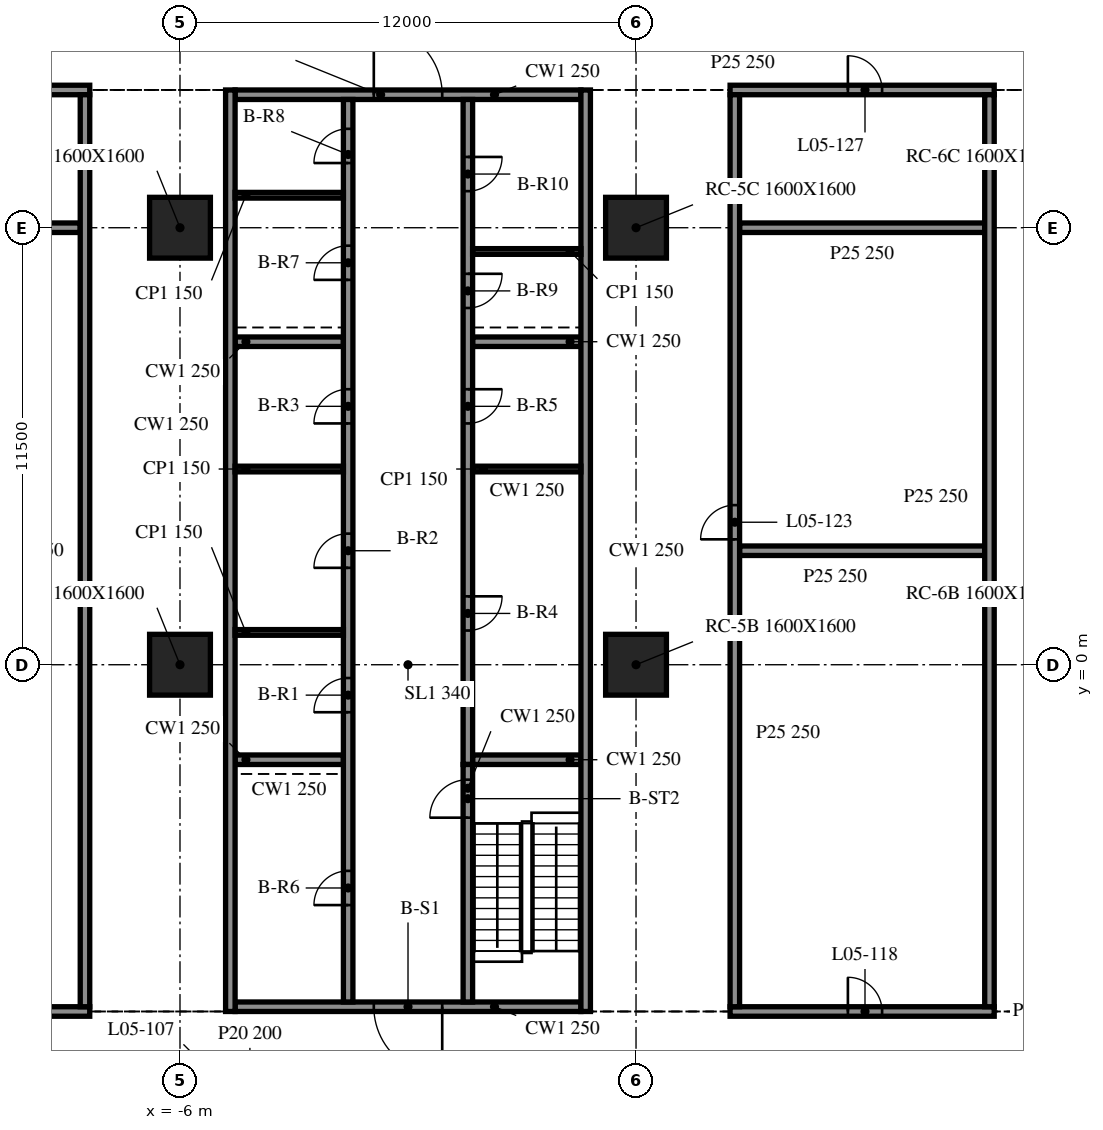
"""IFC4 building model, lengths in metres.
Left out: names, types, materials, properties, quantities, classifications, styles, units other than length and angle.
Written with IfcOpenShell. Run it as: python <this file> out.ifc"""

import sys

from ifc_helpers import new_model, si_unit, direction, frame, frame_2d, origin, origin_2d, place, context, subcontext, project, spatial, rectangle, extrude, element, fill, save


model = new_model("IFC4")
c1 = context("Model", 3, precision=1e-05, world=origin(), true_north=direction((0.0, 1.0)))
c2 = subcontext(c1, "Body", "Model", "MODEL_VIEW")
j1 = project(units=[si_unit("LENGTHUNIT", "METRE"), si_unit("PLANEANGLEUNIT", "RADIAN")], contexts=[c1])
p1 = place(None, origin())
s1 = spatial("IfcSite", under=j1, at=p1, CompositionType="ELEMENT")
p2 = place(p1, origin())
s2 = spatial("IfcBuilding", under=s1, at=p2, CompositionType="ELEMENT")
p3 = place(p2, frame((0.0, 0.0, 24.4)))
s3 = spatial("IfcBuildingStorey", under=s2, at=p3, CompositionType="ELEMENT", Elevation=24.4)
for number, where, z_axis, x_axis in (
    (1, (-6.0, 0.0, -0.34), (0.0, 0.0, 1.0), (1.0, 0.0, 0.0)),
    (2, (-6.0, 11.5, -0.34), (0.0, 0.0, 1.0), (1.0, 0.0, 0.0)),
    (3, (6.0, 0.0, -0.34), (0.0, 0.0, 1.0), (1.0, 0.0, 0.0)),
    (4, (6.0, 11.5, -0.34), (0.0, 0.0, 1.0), (1.0, 0.0, 0.0)),
):
    element("IfcColumn", number, at=place(p3, frame(where, z_axis=z_axis, x_axis=x_axis)), inside=s3, PredefinedType="COLUMN", context=c2, shape_type="SweptSolid", body=[
        extrude(rectangle(XDim=1.6, YDim=1.6, at=origin_2d()), origin(), (0.0, 0.0, 1.0), 4.3),
    ])
for number, where, z_axis, x_axis in (
    (5, (-4.675, 15.125, 0.0), (0.0, 0.0, 1.0), (0.0, -1.0, 0.0)),
    (6, (4.675, -9.125, 0.0), (0.0, 0.0, 1.0), (0.0, 1.0, 0.0)),
):
    element("IfcWall", number, at=place(p3, frame(where, z_axis=z_axis, x_axis=x_axis)), inside=s3, PredefinedType="SOLIDWALL", context=c2, shape_type="SweptSolid", body=[
        extrude(rectangle(XDim=24.25, YDim=0.25, at=frame_2d((12.125, 0.0))), origin(), (0.0, 0.0, 1.0), 3.96),
    ])
p4 = place(p3, frame((4.55, -9.0, 0.0), z_axis=(0.0, 0.0, 1.0), x_axis=(-1.0, 0.0, 0.0)))
e7 = element("IfcWall", 7, at=p4, inside=s3, PredefinedType="SOLIDWALL", context=c2, shape_type="SweptSolid", body=[
    extrude(rectangle(XDim=9.1, YDim=0.25, at=frame_2d((4.55, 0.0))), origin(), (0.0, 0.0, 1.0), 3.96),
])
p5 = place(p4, frame((3.65, 0.0, 0.0)))
e8 = element("IfcOpeningElement", 8, at=p5, cuts=e7, PredefinedType="OPENING", context=c2, shape_type="SweptSolid", body=[
    extrude(rectangle(XDim=1.8, YDim=2.1, at=frame_2d((0.9, 1.05))), frame((0.0, 0.135, 0.0), z_axis=(0.0, -1.0, 0.0), x_axis=(1.0, 0.0, 0.0)), (0.0, 0.0, 1.0), 0.27),
])
p6 = place(p3, frame((-4.55, 15.0, 0.0), z_axis=(0.0, 0.0, 1.0), x_axis=(1.0, 0.0, 0.0)))
e9 = element("IfcWall", 9, at=p6, inside=s3, PredefinedType="SOLIDWALL", context=c2, shape_type="SweptSolid", body=[
    extrude(rectangle(XDim=9.1, YDim=0.25, at=frame_2d((4.55, 0.0))), origin(), (0.0, 0.0, 1.0), 3.96),
])
p7 = place(p6, frame((3.65, 0.0, 0.0)))
e10 = element("IfcOpeningElement", 10, at=p7, cuts=e9, PredefinedType="OPENING", context=c2, shape_type="SweptSolid", body=[
    extrude(rectangle(XDim=1.8, YDim=2.1, at=frame_2d((0.9, 1.05))), frame((0.0, 0.135, 0.0), z_axis=(0.0, -1.0, 0.0), x_axis=(1.0, 0.0, 0.0)), (0.0, 0.0, 1.0), 0.27),
])
p8 = place(p3, frame((-1.575, -8.875, 0.0), z_axis=(0.0, 0.0, 1.0), x_axis=(0.0, 1.0, 0.0)))
e11 = element("IfcWall", 11, at=p8, inside=s3, PredefinedType="SOLIDWALL", context=c2, shape_type="SweptSolid", body=[
    extrude(rectangle(XDim=23.75, YDim=0.25, at=frame_2d((11.875, 0.0))), origin(), (0.0, 0.0, 1.0), 3.96),
])
p9 = place(p8, frame((7.625, 0.0, 0.0)))
e12 = element("IfcOpeningElement", 12, at=p9, cuts=e11, PredefinedType="OPENING", context=c2, shape_type="SweptSolid", body=[
    extrude(rectangle(XDim=0.9, YDim=2.1, at=frame_2d((0.45, 1.05))), frame((0.0, 0.135, 0.0), z_axis=(0.0, -1.0, 0.0), x_axis=(1.0, 0.0, 0.0)), (0.0, 0.0, 1.0), 0.27),
])
p10 = place(p8, frame((11.425, 0.0, 0.0)))
e13 = element("IfcOpeningElement", 13, at=p10, cuts=e11, PredefinedType="OPENING", context=c2, shape_type="SweptSolid", body=[
    extrude(rectangle(XDim=0.9, YDim=2.1, at=frame_2d((0.45, 1.05))), frame((0.0, 0.135, 0.0), z_axis=(0.0, -1.0, 0.0), x_axis=(1.0, 0.0, 0.0)), (0.0, 0.0, 1.0), 0.27),
])
p11 = place(p8, frame((15.225, 0.0, 0.0)))
e14 = element("IfcOpeningElement", 14, at=p11, cuts=e11, PredefinedType="OPENING", context=c2, shape_type="SweptSolid", body=[
    extrude(rectangle(XDim=0.9, YDim=2.1, at=frame_2d((0.45, 1.05))), frame((0.0, 0.135, 0.0), z_axis=(0.0, -1.0, 0.0), x_axis=(1.0, 0.0, 0.0)), (0.0, 0.0, 1.0), 0.27),
])
p12 = place(p8, frame((2.55, 0.0, 0.0)))
e15 = element("IfcOpeningElement", 15, at=p12, cuts=e11, PredefinedType="OPENING", context=c2, shape_type="SweptSolid", body=[
    extrude(rectangle(XDim=0.9, YDim=2.1, at=frame_2d((0.45, 1.05))), frame((0.0, 0.135, 0.0), z_axis=(0.0, -1.0, 0.0), x_axis=(1.0, 0.0, 0.0)), (0.0, 0.0, 1.0), 0.27),
])
p13 = place(p8, frame((19.002, 0.0, 0.0)))
e16 = element("IfcOpeningElement", 16, at=p13, cuts=e11, PredefinedType="OPENING", context=c2, shape_type="SweptSolid", body=[
    extrude(rectangle(XDim=0.9, YDim=2.1, at=frame_2d((0.45, 1.05))), frame((0.0, 0.135, 0.0), z_axis=(0.0, -1.0, 0.0), x_axis=(1.0, 0.0, 0.0)), (0.0, 0.0, 1.0), 0.27),
])
p14 = place(p8, frame((22.077, 0.0, 0.0)))
e17 = element("IfcOpeningElement", 17, at=p14, cuts=e11, PredefinedType="OPENING", context=c2, shape_type="SweptSolid", body=[
    extrude(rectangle(XDim=0.9, YDim=2.1, at=frame_2d((0.45, 1.05))), frame((0.0, 0.135, 0.0), z_axis=(0.0, -1.0, 0.0), x_axis=(1.0, 0.0, 0.0)), (0.0, 0.0, 1.0), 0.27),
])
p15 = place(p3, frame((1.575, -8.875, 0.0), z_axis=(0.0, 0.0, 1.0), x_axis=(0.0, 1.0, 0.0)))
e18 = element("IfcWall", 18, at=p15, inside=s3, PredefinedType="SOLIDWALL", context=c2, shape_type="SweptSolid", body=[
    extrude(rectangle(XDim=6.25, YDim=0.25, at=frame_2d((3.125, 0.0))), origin(), (0.0, 0.0, 1.0), 3.96),
])
p16 = place(p15, frame((4.85, 0.0, 0.0)))
e19 = element("IfcOpeningElement", 19, at=p16, cuts=e18, PredefinedType="OPENING", context=c2, shape_type="SweptSolid", body=[
    extrude(rectangle(XDim=1.0, YDim=2.1, at=frame_2d((0.5, 1.05))), frame((0.0, 0.135, 0.0), z_axis=(0.0, -1.0, 0.0), x_axis=(1.0, 0.0, 0.0)), (0.0, 0.0, 1.0), 0.27),
])
p17 = place(p3, frame((1.575, 14.875, 0.0), z_axis=(0.0, 0.0, 1.0), x_axis=(0.0, -1.0, 0.0)))
e20 = element("IfcWall", 20, at=p17, inside=s3, PredefinedType="SOLIDWALL", context=c2, shape_type="SweptSolid", body=[
    extrude(rectangle(XDim=17.5, YDim=0.25, at=frame_2d((8.75, 0.0))), origin(), (0.0, 0.0, 1.0), 3.96),
])
p18 = place(p17, frame((13.075, 0.0, 0.0)))
e21 = element("IfcOpeningElement", 21, at=p18, cuts=e20, PredefinedType="OPENING", context=c2, shape_type="SweptSolid", body=[
    extrude(rectangle(XDim=0.9, YDim=2.1, at=frame_2d((0.45, 1.05))), frame((0.0, 0.135, 0.0), z_axis=(0.0, -1.0, 0.0), x_axis=(1.0, 0.0, 0.0)), (0.0, 0.0, 1.0), 0.27),
])
p19 = place(p17, frame((7.625, 0.0, 0.0)))
e22 = element("IfcOpeningElement", 22, at=p19, cuts=e20, PredefinedType="OPENING", context=c2, shape_type="SweptSolid", body=[
    extrude(rectangle(XDim=0.9, YDim=2.1, at=frame_2d((0.45, 1.05))), frame((0.0, 0.135, 0.0), z_axis=(0.0, -1.0, 0.0), x_axis=(1.0, 0.0, 0.0)), (0.0, 0.0, 1.0), 0.27),
])
p20 = place(p17, frame((4.587, 0.0, 0.0)))
e23 = element("IfcOpeningElement", 23, at=p20, cuts=e20, PredefinedType="OPENING", context=c2, shape_type="SweptSolid", body=[
    extrude(rectangle(XDim=0.9, YDim=2.1, at=frame_2d((0.45, 1.05))), frame((0.0, 0.135, 0.0), z_axis=(0.0, -1.0, 0.0), x_axis=(1.0, 0.0, 0.0)), (0.0, 0.0, 1.0), 0.27),
])
p21 = place(p17, frame((1.512, 0.0, 0.0)))
e24 = element("IfcOpeningElement", 24, at=p21, cuts=e20, PredefinedType="OPENING", context=c2, shape_type="SweptSolid", body=[
    extrude(rectangle(XDim=0.9, YDim=2.1, at=frame_2d((0.45, 1.05))), frame((0.0, 0.135, 0.0), z_axis=(0.0, -1.0, 0.0), x_axis=(1.0, 0.0, 0.0)), (0.0, 0.0, 1.0), 0.27),
])
for number, where, z_axis, x_axis in (
    (25, (-4.55, -2.5, 0.0), (0.0, 0.0, 1.0), (1.0, 0.0, 0.0)),
    (26, (-4.55, 8.5, 0.0), (0.0, 0.0, 1.0), (1.0, 0.0, 0.0)),
    (27, (1.7, -2.5, 0.0), (0.0, 0.0, 1.0), (1.0, 0.0, 0.0)),
    (28, (1.7, 8.5, 0.0), (0.0, 0.0, 1.0), (1.0, 0.0, 0.0)),
):
    element("IfcWall", number, at=place(p3, frame(where, z_axis=z_axis, x_axis=x_axis)), inside=s3, PredefinedType="SOLIDWALL", context=c2, shape_type="SweptSolid", body=[
        extrude(rectangle(XDim=2.85, YDim=0.25, at=frame_2d((1.425, 0.0))), origin(), (0.0, 0.0, 1.0), 3.96),
    ])
for number, where, z_axis, x_axis in (
    (29, (-4.55, 0.85, 0.0), (0.0, 0.0, 1.0), (1.0, 0.0, 0.0)),
    (30, (-4.55, 5.15, 0.0), (0.0, 0.0, 1.0), (1.0, 0.0, 0.0)),
    (31, (1.7, 5.15, 0.0), (0.0, 0.0, 1.0), (1.0, 0.0, 0.0)),
    (32, (-4.55, 12.355, 0.0), (0.0, 0.0, 1.0), (1.0, 0.0, 0.0)),
    (33, (1.7, 10.875, 0.0), (0.0, 0.0, 1.0), (1.0, 0.0, 0.0)),
):
    element("IfcWall", number, at=place(p3, frame(where, z_axis=z_axis, x_axis=x_axis)), inside=s3, PredefinedType="PARTITIONING", context=c2, shape_type="SweptSolid", body=[
        extrude(rectangle(XDim=2.85, YDim=0.15, at=frame_2d((1.425, 0.0))), origin(), (0.0, 0.0, 1.0), 3.96),
    ])
p22 = place(p3, frame((-15.725, -9.125, 0.0), z_axis=(0.0, 0.0, 1.0), x_axis=(1.0, 0.0, 0.0)))
e34 = element("IfcWall", 34, at=p22, inside=s3, PredefinedType="PARTITIONING", context=c2, shape_type="SweptSolid", body=[
    extrude(rectangle(XDim=7.35, YDim=0.25, at=frame_2d((3.675, 0.0))), origin(), (0.0, 0.0, 1.0), 3.96),
])
p23 = place(p3, frame((8.475, -9.125, 0.0), z_axis=(0.0, 0.0, 1.0), x_axis=(1.0, 0.0, 0.0)))
e35 = element("IfcWall", 35, at=p23, inside=s3, PredefinedType="PARTITIONING", context=c2, shape_type="SweptSolid", body=[
    extrude(rectangle(XDim=6.95, YDim=0.25, at=frame_2d((3.475, 0.0))), origin(), (0.0, 0.0, 1.0), 3.96),
])
p24 = place(p23, frame((3.1, 0.0, 0.0)))
e36 = element("IfcOpeningElement", 36, at=p24, cuts=e35, PredefinedType="OPENING", context=c2, shape_type="SweptSolid", body=[
    extrude(rectangle(XDim=0.9, YDim=2.1, at=frame_2d((0.45, 1.05))), frame((0.0, 0.135, 0.0), z_axis=(0.0, -1.0, 0.0), x_axis=(1.0, 0.0, 0.0)), (0.0, 0.0, 1.0), 0.27),
])
p25 = place(p3, frame((8.725, 3.0, 0.0), z_axis=(0.0, 0.0, 1.0), x_axis=(1.0, 0.0, 0.0)))
e37 = element("IfcWall", 37, at=p25, inside=s3, PredefinedType="PARTITIONING", context=c2, shape_type="SweptSolid", body=[
    extrude(rectangle(XDim=6.45, YDim=0.25, at=frame_2d((3.225, 0.0))), origin(), (0.0, 0.0, 1.0), 3.96),
])
p26 = place(p3, frame((-15.475, 11.5, 0.0), z_axis=(0.0, 0.0, 1.0), x_axis=(1.0, 0.0, 0.0)))
e38 = element("IfcWall", 38, at=p26, inside=s3, PredefinedType="PARTITIONING", context=c2, shape_type="SweptSolid", body=[
    extrude(rectangle(XDim=6.85, YDim=0.25, at=frame_2d((3.425, 0.0))), origin(), (0.0, 0.0, 1.0), 3.96),
])
p27 = place(p3, frame((8.725, 11.5, 0.0), z_axis=(0.0, 0.0, 1.0), x_axis=(1.0, 0.0, 0.0)))
e39 = element("IfcWall", 39, at=p27, inside=s3, PredefinedType="PARTITIONING", context=c2, shape_type="SweptSolid", body=[
    extrude(rectangle(XDim=6.45, YDim=0.25, at=frame_2d((3.225, 0.0))), origin(), (0.0, 0.0, 1.0), 3.96),
])
p28 = place(p3, frame((-15.725, 15.125, 0.0), z_axis=(0.0, 0.0, 1.0), x_axis=(1.0, 0.0, 0.0)))
e40 = element("IfcWall", 40, at=p28, inside=s3, PredefinedType="PARTITIONING", context=c2, shape_type="SweptSolid", body=[
    extrude(rectangle(XDim=7.35, YDim=0.25, at=frame_2d((3.675, 0.0))), origin(), (0.0, 0.0, 1.0), 3.96),
])
p29 = place(p28, frame((3.3, 0.0, 0.0)))
e41 = element("IfcOpeningElement", 41, at=p29, cuts=e40, PredefinedType="OPENING", context=c2, shape_type="SweptSolid", body=[
    extrude(rectangle(XDim=0.9, YDim=2.1, at=frame_2d((0.45, 1.05))), frame((0.0, 0.135, 0.0), z_axis=(0.0, -1.0, 0.0), x_axis=(1.0, 0.0, 0.0)), (0.0, 0.0, 1.0), 0.27),
])
p30 = place(p3, frame((8.475, 15.125, 0.0), z_axis=(0.0, 0.0, 1.0), x_axis=(1.0, 0.0, 0.0)))
e42 = element("IfcWall", 42, at=p30, inside=s3, PredefinedType="PARTITIONING", context=c2, shape_type="SweptSolid", body=[
    extrude(rectangle(XDim=6.95, YDim=0.25, at=frame_2d((3.475, 0.0))), origin(), (0.0, 0.0, 1.0), 3.96),
])
p31 = place(p30, frame((3.1, 0.0, 0.0)))
e43 = element("IfcOpeningElement", 43, at=p31, cuts=e42, PredefinedType="OPENING", context=c2, shape_type="SweptSolid", body=[
    extrude(rectangle(XDim=0.9, YDim=2.1, at=frame_2d((0.45, 1.05))), frame((0.0, 0.135, 0.0), z_axis=(0.0, -1.0, 0.0), x_axis=(1.0, 0.0, 0.0)), (0.0, 0.0, 1.0), 0.27),
])
p32 = place(p3, frame((-8.5, -9.0, 0.0), z_axis=(0.0, 0.0, 1.0), x_axis=(0.0, 1.0, 0.0)))
e44 = element("IfcWall", 44, at=p32, inside=s3, PredefinedType="PARTITIONING", context=c2, shape_type="SweptSolid", body=[
    extrude(rectangle(XDim=24.0, YDim=0.25, at=frame_2d((12.0, 0.0))), origin(), (0.0, 0.0, 1.0), 3.96),
])
p33 = place(p3, frame((8.6, -9.0, 0.0), z_axis=(0.0, 0.0, 1.0), x_axis=(0.0, 1.0, 0.0)))
e45 = element("IfcWall", 45, at=p33, inside=s3, PredefinedType="PARTITIONING", context=c2, shape_type="SweptSolid", body=[
    extrude(rectangle(XDim=24.0, YDim=0.25, at=frame_2d((12.0, 0.0))), origin(), (0.0, 0.0, 1.0), 3.96),
])
p34 = place(p33, frame((12.3, 0.0, 0.0)))
e46 = element("IfcOpeningElement", 46, at=p34, cuts=e45, PredefinedType="OPENING", context=c2, shape_type="SweptSolid", body=[
    extrude(rectangle(XDim=0.9, YDim=2.1, at=frame_2d((0.45, 1.05))), frame((0.0, 0.135, 0.0), z_axis=(0.0, -1.0, 0.0), x_axis=(1.0, 0.0, 0.0)), (0.0, 0.0, 1.0), 0.27),
])
p35 = place(p3, frame((15.3, -9.0, 0.0), z_axis=(0.0, 0.0, 1.0), x_axis=(0.0, 1.0, 0.0)))
e47 = element("IfcWall", 47, at=p35, inside=s3, PredefinedType="PARTITIONING", context=c2, shape_type="SweptSolid", body=[
    extrude(rectangle(XDim=24.0, YDim=0.25, at=frame_2d((12.0, 0.0))), origin(), (0.0, 0.0, 1.0), 3.96),
])
p36 = place(p5, origin())
e48 = element("IfcDoor", 48, at=p36, inside=s3, OperationType="DOUBLE_DOOR_SINGLE_SWING", PredefinedType="DOOR", context=c2, shape_type="SweptSolid", body=[
    extrude(rectangle(XDim=1.8, YDim=2.1, at=frame_2d((0.9, 1.05))), frame((0.0, 0.025, 0.0), z_axis=(0.0, -1.0, 0.0), x_axis=(1.0, 0.0, 0.0)), (0.0, 0.0, 1.0), 0.05),
])
fill(e8, e48)
p37 = place(p7, origin())
e49 = element("IfcDoor", 49, at=p37, inside=s3, OperationType="DOUBLE_DOOR_SINGLE_SWING", PredefinedType="DOOR", context=c2, shape_type="SweptSolid", body=[
    extrude(rectangle(XDim=1.8, YDim=2.1, at=frame_2d((0.9, 1.05))), frame((0.0, 0.025, 0.0), z_axis=(0.0, -1.0, 0.0), x_axis=(1.0, 0.0, 0.0)), (0.0, 0.0, 1.0), 0.05),
])
fill(e10, e49)
p38 = place(p9, origin())
e50 = element("IfcDoor", 50, at=p38, inside=s3, OperationType="SINGLE_SWING_LEFT", PredefinedType="DOOR", context=c2, shape_type="SweptSolid", body=[
    extrude(rectangle(XDim=0.9, YDim=2.1, at=frame_2d((0.45, 1.05))), frame((0.0, 0.025, 0.0), z_axis=(0.0, -1.0, 0.0), x_axis=(1.0, 0.0, 0.0)), (0.0, 0.0, 1.0), 0.05),
])
fill(e12, e50)
p39 = place(p10, origin())
e51 = element("IfcDoor", 51, at=p39, inside=s3, OperationType="SINGLE_SWING_RIGHT", PredefinedType="DOOR", context=c2, shape_type="SweptSolid", body=[
    extrude(rectangle(XDim=0.9, YDim=2.1, at=frame_2d((0.45, 1.05))), frame((0.0, 0.025, 0.0), z_axis=(0.0, -1.0, 0.0), x_axis=(1.0, 0.0, 0.0)), (0.0, 0.0, 1.0), 0.05),
])
fill(e13, e51)
p40 = place(p11, origin())
e52 = element("IfcDoor", 52, at=p40, inside=s3, OperationType="SINGLE_SWING_LEFT", PredefinedType="DOOR", context=c2, shape_type="SweptSolid", body=[
    extrude(rectangle(XDim=0.9, YDim=2.1, at=frame_2d((0.45, 1.05))), frame((0.0, 0.025, 0.0), z_axis=(0.0, -1.0, 0.0), x_axis=(1.0, 0.0, 0.0)), (0.0, 0.0, 1.0), 0.05),
])
fill(e14, e52)
p41 = place(p18, origin())
e53 = element("IfcDoor", 53, at=p41, inside=s3, OperationType="SINGLE_SWING_RIGHT", PredefinedType="DOOR", context=c2, shape_type="SweptSolid", body=[
    extrude(rectangle(XDim=0.9, YDim=2.1, at=frame_2d((0.45, 1.05))), frame((0.0, 0.025, 0.0), z_axis=(0.0, -1.0, 0.0), x_axis=(1.0, 0.0, 0.0)), (0.0, 0.0, 1.0), 0.05),
])
fill(e21, e53)
p42 = place(p19, origin())
e54 = element("IfcDoor", 54, at=p42, inside=s3, OperationType="SINGLE_SWING_LEFT", PredefinedType="DOOR", context=c2, shape_type="SweptSolid", body=[
    extrude(rectangle(XDim=0.9, YDim=2.1, at=frame_2d((0.45, 1.05))), frame((0.0, 0.025, 0.0), z_axis=(0.0, -1.0, 0.0), x_axis=(1.0, 0.0, 0.0)), (0.0, 0.0, 1.0), 0.05),
])
fill(e22, e54)
p43 = place(p12, origin())
e55 = element("IfcDoor", 55, at=p43, inside=s3, OperationType="SINGLE_SWING_RIGHT", PredefinedType="DOOR", context=c2, shape_type="SweptSolid", body=[
    extrude(rectangle(XDim=0.9, YDim=2.1, at=frame_2d((0.45, 1.05))), frame((0.0, 0.025, 0.0), z_axis=(0.0, -1.0, 0.0), x_axis=(1.0, 0.0, 0.0)), (0.0, 0.0, 1.0), 0.05),
])
fill(e15, e55)
p44 = place(p13, origin())
e56 = element("IfcDoor", 56, at=p44, inside=s3, OperationType="SINGLE_SWING_LEFT", PredefinedType="DOOR", context=c2, shape_type="SweptSolid", body=[
    extrude(rectangle(XDim=0.9, YDim=2.1, at=frame_2d((0.45, 1.05))), frame((0.0, 0.025, 0.0), z_axis=(0.0, -1.0, 0.0), x_axis=(1.0, 0.0, 0.0)), (0.0, 0.0, 1.0), 0.05),
])
fill(e16, e56)
p45 = place(p14, origin())
e57 = element("IfcDoor", 57, at=p45, inside=s3, OperationType="SINGLE_SWING_RIGHT", PredefinedType="DOOR", context=c2, shape_type="SweptSolid", body=[
    extrude(rectangle(XDim=0.9, YDim=2.1, at=frame_2d((0.45, 1.05))), frame((0.0, 0.025, 0.0), z_axis=(0.0, -1.0, 0.0), x_axis=(1.0, 0.0, 0.0)), (0.0, 0.0, 1.0), 0.05),
])
fill(e17, e57)
p46 = place(p20, origin())
e58 = element("IfcDoor", 58, at=p46, inside=s3, OperationType="SINGLE_SWING_LEFT", PredefinedType="DOOR", context=c2, shape_type="SweptSolid", body=[
    extrude(rectangle(XDim=0.9, YDim=2.1, at=frame_2d((0.45, 1.05))), frame((0.0, 0.025, 0.0), z_axis=(0.0, -1.0, 0.0), x_axis=(1.0, 0.0, 0.0)), (0.0, 0.0, 1.0), 0.05),
])
fill(e23, e58)
p47 = place(p21, origin())
e59 = element("IfcDoor", 59, at=p47, inside=s3, OperationType="SINGLE_SWING_RIGHT", PredefinedType="DOOR", context=c2, shape_type="SweptSolid", body=[
    extrude(rectangle(XDim=0.9, YDim=2.1, at=frame_2d((0.45, 1.05))), frame((0.0, 0.025, 0.0), z_axis=(0.0, -1.0, 0.0), x_axis=(1.0, 0.0, 0.0)), (0.0, 0.0, 1.0), 0.05),
])
fill(e24, e59)
p48 = place(p16, origin())
e60 = element("IfcDoor", 60, at=p48, inside=s3, OperationType="SINGLE_SWING_LEFT", PredefinedType="DOOR", context=c2, shape_type="SweptSolid", body=[
    extrude(rectangle(XDim=1.0, YDim=2.1, at=frame_2d((0.5, 1.05))), frame((0.0, 0.025, 0.0), z_axis=(0.0, -1.0, 0.0), x_axis=(1.0, 0.0, 0.0)), (0.0, 0.0, 1.0), 0.05),
])
fill(e19, e60)
p49 = place(p24, origin())
e61 = element("IfcDoor", 61, at=p49, inside=s3, OperationType="SINGLE_SWING_RIGHT", PredefinedType="DOOR", context=c2, shape_type="SweptSolid", body=[
    extrude(rectangle(XDim=0.9, YDim=2.1, at=frame_2d((0.45, 1.05))), frame((0.0, 0.025, 0.0), z_axis=(0.0, -1.0, 0.0), x_axis=(1.0, 0.0, 0.0)), (0.0, 0.0, 1.0), 0.05),
])
fill(e36, e61)
p50 = place(p34, origin())
e62 = element("IfcDoor", 62, at=p50, inside=s3, OperationType="SINGLE_SWING_LEFT", PredefinedType="DOOR", context=c2, shape_type="SweptSolid", body=[
    extrude(rectangle(XDim=0.9, YDim=2.1, at=frame_2d((0.45, 1.05))), frame((0.0, 0.025, 0.0), z_axis=(0.0, -1.0, 0.0), x_axis=(1.0, 0.0, 0.0)), (0.0, 0.0, 1.0), 0.05),
])
fill(e46, e62)
p51 = place(p31, origin())
e63 = element("IfcDoor", 63, at=p51, inside=s3, OperationType="SINGLE_SWING_LEFT", PredefinedType="DOOR", context=c2, shape_type="SweptSolid", body=[
    extrude(rectangle(XDim=0.9, YDim=2.1, at=frame_2d((0.45, 1.05))), frame((0.0, 0.025, 0.0), z_axis=(0.0, -1.0, 0.0), x_axis=(1.0, 0.0, 0.0)), (0.0, 0.0, 1.0), 0.05),
])
fill(e43, e63)
save(model, sys.argv[1])
